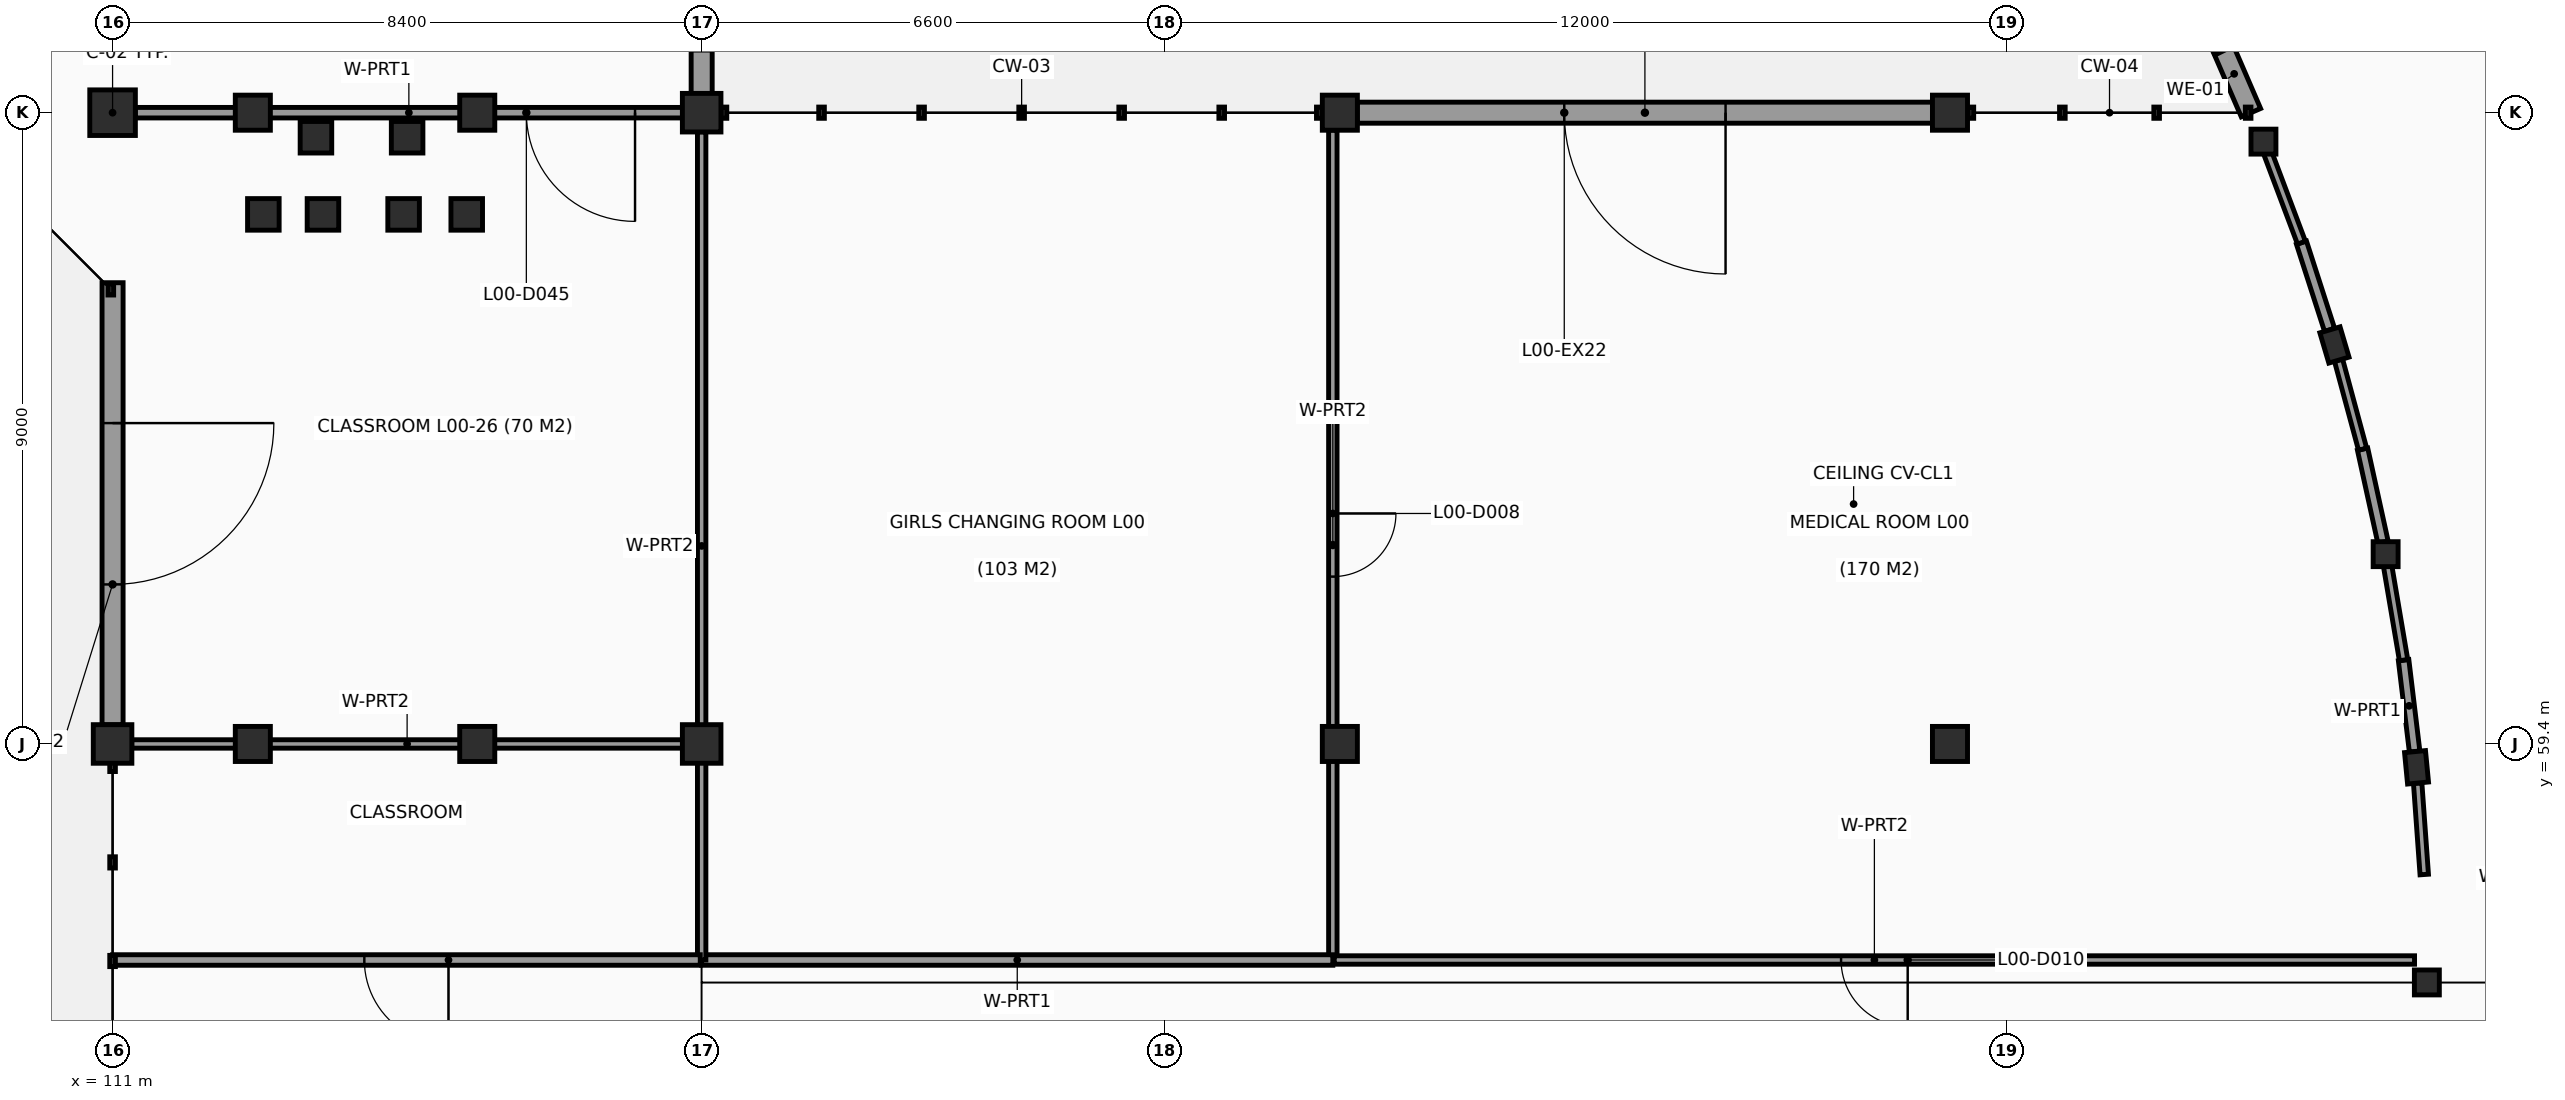
"""IFC4 building model, lengths in metres.
Left out: names, types, materials, properties, quantities, classifications, styles, units other than length and angle.
Written with IfcOpenShell. Run it as: python <this file> out.ifc"""

import sys

from ifc_helpers import new_model, si_unit, direction, frame, frame_2d, origin, origin_2d, place, context, subcontext, project, spatial, rectangle, hollow_circle, i_section, extrude, element, fill, save


model = new_model("IFC4")
c1 = context("Model", 3, precision=1e-05, world=origin(), true_north=direction((0.0, 1.0)))
c2 = subcontext(c1, "Body", "Model", "MODEL_VIEW")
j1 = project(units=[si_unit("LENGTHUNIT", "METRE"), si_unit("PLANEANGLEUNIT", "RADIAN")], contexts=[c1])
p1 = place(None, origin())
s1 = spatial("IfcSite", under=j1, at=p1, CompositionType="ELEMENT")
p2 = place(p1, origin())
s2 = spatial("IfcBuilding", under=s1, at=p2, CompositionType="ELEMENT")
p3 = place(p2, origin())
s3 = spatial("IfcBuildingStorey", under=s2, at=p3, CompositionType="ELEMENT", Elevation=0.0)
p4 = place(p3, frame((111.0, 59.4, -0.4), z_axis=(0.0, 0.0, 1.0), x_axis=(1.0, 0.0, 0.0)))
e1 = element("IfcColumn", 1, at=p4, inside=s3, PredefinedType="COLUMN", context=c2, shape_type="SweptSolid", body=[
    extrude(rectangle(XDim=0.55, YDim=0.55, at=origin_2d()), origin(), (0.0, 0.0, 1.0), 4.6),
])
p5 = place(p3, frame((111.0, 68.4, -0.4), z_axis=(0.0, 0.0, 1.0), x_axis=(1.0, 0.0, 0.0)))
e2 = element("IfcColumn", 2, at=p5, inside=s3, PredefinedType="COLUMN", context=c2, shape_type="SweptSolid", body=[
    extrude(rectangle(XDim=0.65, YDim=0.65, at=origin_2d()), origin(), (0.0, 0.0, 1.0), 4.6),
])
for number, where, z_axis, x_axis in (
    (3, (119.4, 59.4, -0.4), (0.0, 0.0, 1.0), (1.0, 0.0, 0.0)),
    (4, (119.4, 68.4, -0.4), (0.0, 0.0, 1.0), (1.0, 0.0, 0.0)),
):
    element("IfcColumn", number, at=place(p3, frame(where, z_axis=z_axis, x_axis=x_axis)), inside=s3, PredefinedType="COLUMN", context=c2, shape_type="SweptSolid", body=[
        extrude(rectangle(XDim=0.55, YDim=0.55, at=origin_2d()), origin(), (0.0, 0.0, 1.0), 4.6),
    ])
for number, where, z_axis, x_axis in (
    (5, (116.2, 59.4, -0.4), (0.0, 0.0, 1.0), (1.0, 0.0, 0.0)),
    (6, (116.2, 68.4, -0.4), (0.0, 0.0, 1.0), (1.0, 0.0, 0.0)),
    (7, (113.0, 59.4, -0.4), (0.0, 0.0, 1.0), (1.0, 0.0, 0.0)),
    (8, (113.0, 68.4, -0.4), (0.0, 0.0, 1.0), (1.0, 0.0, 0.0)),
    (9, (128.5, 59.4, -0.4), (0.0, 0.0, 1.0), (1.0, 0.0, 0.0)),
    (10, (128.5, 68.4, -0.4), (0.0, 0.0, 1.0), (1.0, 0.0, 0.0)),
    (11, (137.2, 59.4, -0.4), (0.0, 0.0, 1.0), (1.0, 0.0, 0.0)),
    (12, (137.2, 68.4, -0.4), (0.0, 0.0, 1.0), (1.0, 0.0, 0.0)),
):
    element("IfcColumn", number, at=place(p3, frame(where, z_axis=z_axis, x_axis=x_axis)), inside=s3, PredefinedType="COLUMN", context=c2, shape_type="SweptSolid", body=[
        extrude(rectangle(XDim=0.5, YDim=0.5, at=origin_2d()), origin(), (0.0, 0.0, 1.0), 4.6),
    ])
p6 = place(p3, frame((144.0, 56.0, -0.4), z_axis=(0.0, 0.0, 1.0), x_axis=(1.0, 0.0, 0.0)))
e13 = element("IfcColumn", 13, at=p6, inside=s3, PredefinedType="COLUMN", context=c2, shape_type="SweptSolid", body=[
    extrude(hollow_circle(Radius=0.178, WallThickness=0.016, at=origin_2d()), origin(), (0.0, 0.0, 1.0), 4.6),
])
p7 = place(p3, frame((143.853, 59.067, -0.4), z_axis=(0.0, 0.0, 1.0), x_axis=(0.995396198367, 0.09584575252, 0.0)))
e14 = element("IfcColumn", 14, at=p7, inside=s3, PredefinedType="COLUMN", context=c2, shape_type="SweptSolid", body=[
    extrude(i_section(OverallWidth=0.3, OverallDepth=0.45, WebThickness=0.014, FlangeThickness=0.026, FilletRadius=0.027, at=origin_2d()), origin(), (0.0, 0.0, 1.0), 4.6),
])
p8 = place(p3, frame((143.412, 62.106, -0.4), z_axis=(0.0, 0.0, 1.0), x_axis=(1.0, 0.0, 0.0)))
e15 = element("IfcColumn", 15, at=p8, inside=s3, PredefinedType="COLUMN", context=c2, shape_type="SweptSolid", body=[
    extrude(hollow_circle(Radius=0.178, WallThickness=0.016, at=origin_2d()), origin(), (0.0, 0.0, 1.0), 4.6),
])
p9 = place(p3, frame((142.682, 65.088, -0.4), z_axis=(0.0, 0.0, 1.0), x_axis=(0.958819734868, 0.284015344704, 0.0)))
e16 = element("IfcColumn", 16, at=p9, inside=s3, PredefinedType="COLUMN", context=c2, shape_type="SweptSolid", body=[
    extrude(i_section(OverallWidth=0.3, OverallDepth=0.45, WebThickness=0.014, FlangeThickness=0.026, FilletRadius=0.027, at=origin_2d()), origin(), (0.0, 0.0, 1.0), 4.6),
])
p10 = place(p3, frame((141.67, 67.987, -0.4), z_axis=(0.0, 0.0, 1.0), x_axis=(1.0, 0.0, 0.0)))
e17 = element("IfcColumn", 17, at=p10, inside=s3, PredefinedType="COLUMN", context=c2, shape_type="SweptSolid", body=[
    extrude(hollow_circle(Radius=0.178, WallThickness=0.016, at=origin_2d()), origin(), (0.0, 0.0, 1.0), 4.6),
])
for number, where, z_axis, x_axis in (
    (18, (115.15, 66.95, -0.4), (0.0, 0.0, 1.0), (1.0, 0.0, 0.0)),
    (19, (116.05, 66.95, -0.4), (0.0, 0.0, 1.0), (1.0, 0.0, 0.0)),
    (20, (115.2, 68.05, -0.4), (0.0, 0.0, 1.0), (1.0, 0.0, 0.0)),
    (21, (113.15, 66.95, -0.4), (0.0, 0.0, 1.0), (1.0, 0.0, 0.0)),
    (22, (114.0, 66.95, -0.4), (0.0, 0.0, 1.0), (1.0, 0.0, 0.0)),
    (23, (113.9, 68.05, -0.4), (0.0, 0.0, 1.0), (1.0, 0.0, 0.0)),
):
    element("IfcColumn", number, at=place(p3, frame(where, z_axis=z_axis, x_axis=x_axis)), inside=s3, PredefinedType="COLUMN", context=c2, shape_type="SweptSolid", body=[
        extrude(rectangle(XDim=0.45, YDim=0.45, at=origin_2d()), origin(), (0.0, 0.0, 1.0), 4.6),
    ])
p11 = place(p3, frame((119.4, 71.077, 0.0), z_axis=(0.0, 0.0, 1.0), x_axis=(0.0, -1.0, 0.0)))
e24 = element("IfcWall", 24, at=p11, inside=s3, PredefinedType="SOLIDWALL", context=c2, shape_type="SweptSolid", body=[
    extrude(rectangle(XDim=2.404, YDim=0.3, at=frame_2d((1.202, 0.0))), origin(), (0.0, 0.0, 1.0), 3.22),
])
p12 = place(p11, frame((0.602, 0.0, 0.95)))
e25 = element("IfcOpeningElement", 25, at=p12, cuts=e24, PredefinedType="OPENING", context=c2, shape_type="SweptSolid", body=[
    extrude(rectangle(XDim=1.2, YDim=1.2, at=frame_2d((0.6, 0.6))), frame((0.0, 0.16, 0.0), z_axis=(0.0, -1.0, 0.0), x_axis=(1.0, 0.0, 0.0)), (0.0, 0.0, 1.0), 0.32),
])
p13 = place(p3, frame((128.748, 68.4, 0.0), z_axis=(0.0, 0.0, 1.0), x_axis=(1.0, 0.0, 0.0)))
e26 = element("IfcWall", 26, at=p13, inside=s3, PredefinedType="SOLIDWALL", context=c2, shape_type="SweptSolid", body=[
    extrude(rectangle(XDim=8.204, YDim=0.3, at=frame_2d((4.102, 0.0))), origin(), (0.0, 0.0, 1.0), 3.92),
])
p14 = place(p13, frame((2.952, 0.0, 0.0)))
e27 = element("IfcOpeningElement", 27, at=p14, cuts=e26, PredefinedType="OPENING", context=c2, shape_type="SweptSolid", body=[
    extrude(rectangle(XDim=2.3, YDim=2.4, at=frame_2d((1.15, 1.2))), frame((0.0, 0.16, 0.0), z_axis=(0.0, -1.0, 0.0), x_axis=(1.0, 0.0, 0.0)), (0.0, 0.0, 1.0), 0.32),
])
p15 = place(p3, frame((141.492, 68.4, 0.0), z_axis=(0.0, 0.0, 1.0), x_axis=(-0.396823605791, 0.917894888256, 0.0)))
e28 = element("IfcWall", 28, at=p15, inside=s3, PredefinedType="SOLIDWALL", context=c2, shape_type="SweptSolid", body=[
    extrude(rectangle(XDim=1.207, YDim=0.3, at=frame_2d((0.603, 0.0))), origin(), (0.0, 0.0, 1.0), 3.54),
])
p16 = place(p3, frame((141.113, 69.289, 0.0), z_axis=(0.0, 0.0, 1.0), x_axis=(-0.440367841155, 0.897817444961, 0.0)))
e29 = element("IfcWall", 29, at=p16, inside=s3, PredefinedType="SOLIDWALL", context=c2, shape_type="SweptSolid", body=[
    extrude(rectangle(XDim=1.429, YDim=0.3, at=frame_2d((0.715, 0.0))), origin(), (0.0, 0.0, 1.0), 3.54),
])
p17 = place(p3, frame((111.0, 59.673, 0.0), z_axis=(0.0, 0.0, 1.0), x_axis=(0.0, 1.0, 0.0)))
e30 = element("IfcWall", 30, at=p17, inside=s3, PredefinedType="SOLIDWALL", context=c2, shape_type="SweptSolid", body=[
    extrude(rectangle(XDim=6.303, YDim=0.3, at=frame_2d((3.151, 0.0))), origin(), (0.0, 0.0, 1.0), 3.22),
])
p18 = place(p17, frame((2.001, 0.0, 0.0)))
e31 = element("IfcOpeningElement", 31, at=p18, cuts=e30, PredefinedType="OPENING", context=c2, shape_type="SweptSolid", body=[
    extrude(rectangle(XDim=2.3, YDim=2.4, at=frame_2d((1.15, 1.2))), frame((0.0, 0.16, 0.0), z_axis=(0.0, -1.0, 0.0), x_axis=(1.0, 0.0, 0.0)), (0.0, 0.0, 1.0), 0.32),
])
p19 = place(p3, frame((143.963, 57.539, 0.0), z_axis=(0.0, 0.0, 1.0), x_axis=(-0.071977769647, 0.997406236534, 0.0)))
e32 = element("IfcWall", 32, at=p19, inside=s3, PredefinedType="PARTITIONING", context=c2, shape_type="SweptSolid", body=[
    extrude(rectangle(XDim=1.306, YDim=0.12, at=frame_2d((0.653, 0.0))), origin(), (0.0, 0.0, 1.0), 3.54),
])
p20 = place(p3, frame((143.825, 59.292, 0.0), z_axis=(0.0, 0.0, 1.0), x_axis=(-0.119775911082, 0.992800952419, 0.0)))
e33 = element("IfcWall", 33, at=p20, inside=s3, PredefinedType="PARTITIONING", context=c2, shape_type="SweptSolid", body=[
    extrude(rectangle(XDim=1.313, YDim=0.15, at=frame_2d((0.656, 0.0))), origin(), (0.0, 0.0, 1.0), 3.54),
])
p21 = place(p3, frame((143.668, 60.595, 0.0), z_axis=(0.0, 0.0, 1.0), x_axis=(-0.167200153684, 0.985922972959, 0.0)))
e34 = element("IfcWall", 34, at=p21, inside=s3, PredefinedType="PARTITIONING", context=c2, shape_type="SweptSolid", body=[
    extrude(rectangle(XDim=1.356, YDim=0.12, at=frame_2d((0.678, 0.0))), origin(), (0.0, 0.0, 1.0), 3.54),
])
p22 = place(p3, frame((143.374, 62.278, 0.0), z_axis=(0.0, 0.0, 1.0), x_axis=(-0.214357038875, 0.976755373614, 0.0)))
e35 = element("IfcWall", 35, at=p22, inside=s3, PredefinedType="PARTITIONING", context=c2, shape_type="SweptSolid", body=[
    extrude(rectangle(XDim=1.356, YDim=0.15, at=frame_2d((0.678, 0.0))), origin(), (0.0, 0.0, 1.0), 3.54),
])
p23 = place(p3, frame((143.083, 63.603, 0.0), z_axis=(0.0, 0.0, 1.0), x_axis=(-0.260740388101, 0.965408954803, 0.0)))
e36 = element("IfcWall", 36, at=p23, inside=s3, PredefinedType="PARTITIONING", context=c2, shape_type="SweptSolid", body=[
    extrude(rectangle(XDim=1.313, YDim=0.12, at=frame_2d((0.656, 0.0))), origin(), (0.0, 0.0, 1.0), 3.54),
])
p24 = place(p3, frame((142.613, 65.304, 0.0), z_axis=(0.0, 0.0, 1.0), x_axis=(-0.306844339678, 0.951759712957, 0.0)))
e37 = element("IfcWall", 37, at=p24, inside=s3, PredefinedType="PARTITIONING", context=c2, shape_type="SweptSolid", body=[
    extrude(rectangle(XDim=1.306, YDim=0.15, at=frame_2d((0.653, 0.0))), origin(), (0.0, 0.0, 1.0), 3.54),
])
p25 = place(p3, frame((142.212, 66.547, 0.0), z_axis=(0.0, 0.0, 1.0), x_axis=(-0.352261479971, 0.935901623959, 0.0)))
e38 = element("IfcWall", 38, at=p25, inside=s3, PredefinedType="PARTITIONING", context=c2, shape_type="SweptSolid", body=[
    extrude(rectangle(XDim=1.363, YDim=0.12, at=frame_2d((0.682, 0.0))), origin(), (0.0, 0.0, 1.0), 3.54),
])
p26 = place(p3, frame((128.4, 68.152, 0.0), z_axis=(0.0, 0.0, 1.0), x_axis=(0.0, -1.0, 0.0)))
e39 = element("IfcWall", 39, at=p26, inside=s3, PredefinedType="PARTITIONING", context=c2, shape_type="SweptSolid", body=[
    extrude(rectangle(XDim=11.832, YDim=0.12, at=frame_2d((5.916, 0.0))), origin(), (0.0, 0.0, 1.0), 3.92),
])
p27 = place(p26, frame((5.466, 0.0, 0.0)))
e40 = element("IfcOpeningElement", 40, at=p27, cuts=e39, PredefinedType="OPENING", context=c2, shape_type="SweptSolid", body=[
    extrude(rectangle(XDim=0.9, YDim=2.1, at=frame_2d((0.45, 1.05))), frame((0.0, 0.07, 0.0), z_axis=(0.0, -1.0, 0.0), x_axis=(1.0, 0.0, 0.0)), (0.0, 0.0, 1.0), 0.14),
])
p28 = place(p3, frame((128.4, 56.32, 0.0), z_axis=(0.0, 0.0, 1.0), x_axis=(-1.0, 0.0, 0.0)))
e41 = element("IfcWall", 41, at=p28, inside=s3, PredefinedType="PARTITIONING", context=c2, shape_type="SweptSolid", body=[
    extrude(rectangle(XDim=9.0, YDim=0.15, at=frame_2d((4.5, 0.0))), origin(), (0.0, 0.0, 1.0), 3.32),
])
p29 = place(p3, frame((119.4, 56.32, 0.0), z_axis=(0.0, 0.0, 1.0), x_axis=(0.0, 1.0, 0.0)))
e42 = element("IfcWall", 42, at=p29, inside=s3, PredefinedType="PARTITIONING", context=c2, shape_type="SweptSolid", body=[
    extrude(rectangle(XDim=11.807, YDim=0.12, at=frame_2d((5.903, 0.0))), origin(), (0.0, 0.0, 1.0), 3.32),
])
p30 = place(p3, frame((143.824, 56.32, 0.0), z_axis=(0.0, 0.0, 1.0), x_axis=(-1.0, 0.0, 0.0)))
e43 = element("IfcWall", 43, at=p30, inside=s3, PredefinedType="PARTITIONING", context=c2, shape_type="SweptSolid", body=[
    extrude(rectangle(XDim=15.404, YDim=0.12, at=frame_2d((7.702, 0.0))), origin(), (0.0, 0.0, 1.0), 3.54),
])
p31 = place(p30, frame((7.227, 0.0, 0.0)))
e44 = element("IfcOpeningElement", 44, at=p31, cuts=e43, PredefinedType="OPENING", context=c2, shape_type="SweptSolid", body=[
    extrude(rectangle(XDim=0.95, YDim=2.1, at=frame_2d((0.475, 1.05))), frame((0.0, 0.07, 0.0), z_axis=(0.0, -1.0, 0.0), x_axis=(1.0, 0.0, 0.0)), (0.0, 0.0, 1.0), 0.14),
])
p32 = place(p3, frame((119.38, 56.32, 0.0), z_axis=(0.0, 0.0, 1.0), x_axis=(-1.0, 0.0, 0.0)))
e45 = element("IfcWall", 45, at=p32, inside=s3, PredefinedType="PARTITIONING", context=c2, shape_type="SweptSolid", body=[
    extrude(rectangle(XDim=8.38, YDim=0.15, at=frame_2d((4.19, 0.0))), origin(), (0.0, 0.0, 1.0), 3.22),
])
p33 = place(p32, frame((3.59, 0.0, 0.0)))
e46 = element("IfcOpeningElement", 46, at=p33, cuts=e45, PredefinedType="OPENING", context=c2, shape_type="SweptSolid", body=[
    extrude(rectangle(XDim=1.2, YDim=2.15, at=frame_2d((0.6, 1.075))), frame((0.0, 0.085, 0.0), z_axis=(0.0, -1.0, 0.0), x_axis=(1.0, 0.0, 0.0)), (0.0, 0.0, 1.0), 0.17),
])
p34 = place(p3, frame((111.273, 59.4, 0.0), z_axis=(0.0, 0.0, 1.0), x_axis=(1.0, 0.0, 0.0)))
e47 = element("IfcWall", 47, at=p34, inside=s3, PredefinedType="PARTITIONING", context=c2, shape_type="SweptSolid", body=[
    extrude(rectangle(XDim=7.854, YDim=0.12, at=frame_2d((3.927, 0.0))), origin(), (0.0, 0.0, 1.0), 3.53),
])
p35 = place(p3, frame((111.323, 68.4, 0.0), z_axis=(0.0, 0.0, 1.0), x_axis=(1.0, 0.0, 0.0)))
e48 = element("IfcWall", 48, at=p35, inside=s3, PredefinedType="PARTITIONING", context=c2, shape_type="SweptSolid", body=[
    extrude(rectangle(XDim=7.804, YDim=0.15, at=frame_2d((3.902, 0.0))), origin(), (0.0, 0.0, 1.0), 3.17),
])
p36 = place(p35, frame((5.577, 0.0, 0.0)))
e49 = element("IfcOpeningElement", 49, at=p36, cuts=e48, PredefinedType="OPENING", context=c2, shape_type="SweptSolid", body=[
    extrude(rectangle(XDim=1.55, YDim=2.2, at=frame_2d((0.775, 1.1))), frame((0.0, 0.085, 0.0), z_axis=(0.0, -1.0, 0.0), x_axis=(1.0, 0.0, 0.0)), (0.0, 0.0, 1.0), 0.17),
])
p37 = place(p14, origin())
e50 = element("IfcDoor", 50, at=p37, inside=s3, OperationType="DOUBLE_DOOR_SINGLE_SWING", PredefinedType="DOOR", context=c2, shape_type="SweptSolid", body=[
    extrude(rectangle(XDim=2.3, YDim=2.4, at=frame_2d((1.15, 1.2))), frame((0.0, 0.025, 0.0), z_axis=(0.0, -1.0, 0.0), x_axis=(1.0, 0.0, 0.0)), (0.0, 0.0, 1.0), 0.05),
])
fill(e27, e50)
p38 = place(p18, origin())
e51 = element("IfcDoor", 51, at=p38, inside=s3, OperationType="DOUBLE_DOOR_SINGLE_SWING", PredefinedType="DOOR", context=c2, shape_type="SweptSolid", body=[
    extrude(rectangle(XDim=2.3, YDim=2.4, at=frame_2d((1.15, 1.2))), frame((0.0, 0.025, 0.0), z_axis=(0.0, -1.0, 0.0), x_axis=(1.0, 0.0, 0.0)), (0.0, 0.0, 1.0), 0.05),
])
fill(e31, e51)
p39 = place(p27, origin())
e52 = element("IfcDoor", 52, at=p39, inside=s3, OperationType="SINGLE_SWING_LEFT", PredefinedType="DOOR", context=c2, shape_type="SweptSolid", body=[
    extrude(rectangle(XDim=0.9, YDim=2.1, at=frame_2d((0.45, 1.05))), frame((0.0, 0.025, 0.0), z_axis=(0.0, -1.0, 0.0), x_axis=(1.0, 0.0, 0.0)), (0.0, 0.0, 1.0), 0.05),
])
fill(e40, e52)
p40 = place(p31, origin())
e53 = element("IfcDoor", 53, at=p40, inside=s3, OperationType="SINGLE_SWING_LEFT", PredefinedType="DOOR", context=c2, shape_type="SweptSolid", body=[
    extrude(rectangle(XDim=0.95, YDim=2.1, at=frame_2d((0.475, 1.05))), frame((0.0, 0.025, 0.0), z_axis=(0.0, -1.0, 0.0), x_axis=(1.0, 0.0, 0.0)), (0.0, 0.0, 1.0), 0.05),
])
fill(e44, e53)
p41 = place(p33, origin())
e54 = element("IfcDoor", 54, at=p41, inside=s3, OperationType="SINGLE_SWING_LEFT", PredefinedType="DOOR", context=c2, shape_type="SweptSolid", body=[
    extrude(rectangle(XDim=1.2, YDim=2.15, at=frame_2d((0.6, 1.075))), frame((0.0, 0.025, 0.0), z_axis=(0.0, -1.0, 0.0), x_axis=(1.0, 0.0, 0.0)), (0.0, 0.0, 1.0), 0.05),
])
fill(e46, e54)
p42 = place(p36, origin())
e55 = element("IfcDoor", 55, at=p42, inside=s3, OperationType="DOUBLE_DOOR_SINGLE_SWING", PredefinedType="DOOR", context=c2, shape_type="SweptSolid", body=[
    extrude(rectangle(XDim=1.55, YDim=2.2, at=frame_2d((0.775, 1.1))), frame((0.0, 0.025, 0.0), z_axis=(0.0, -1.0, 0.0), x_axis=(1.0, 0.0, 0.0)), (0.0, 0.0, 1.0), 0.05),
])
fill(e49, e55)
save(model, sys.argv[1])
